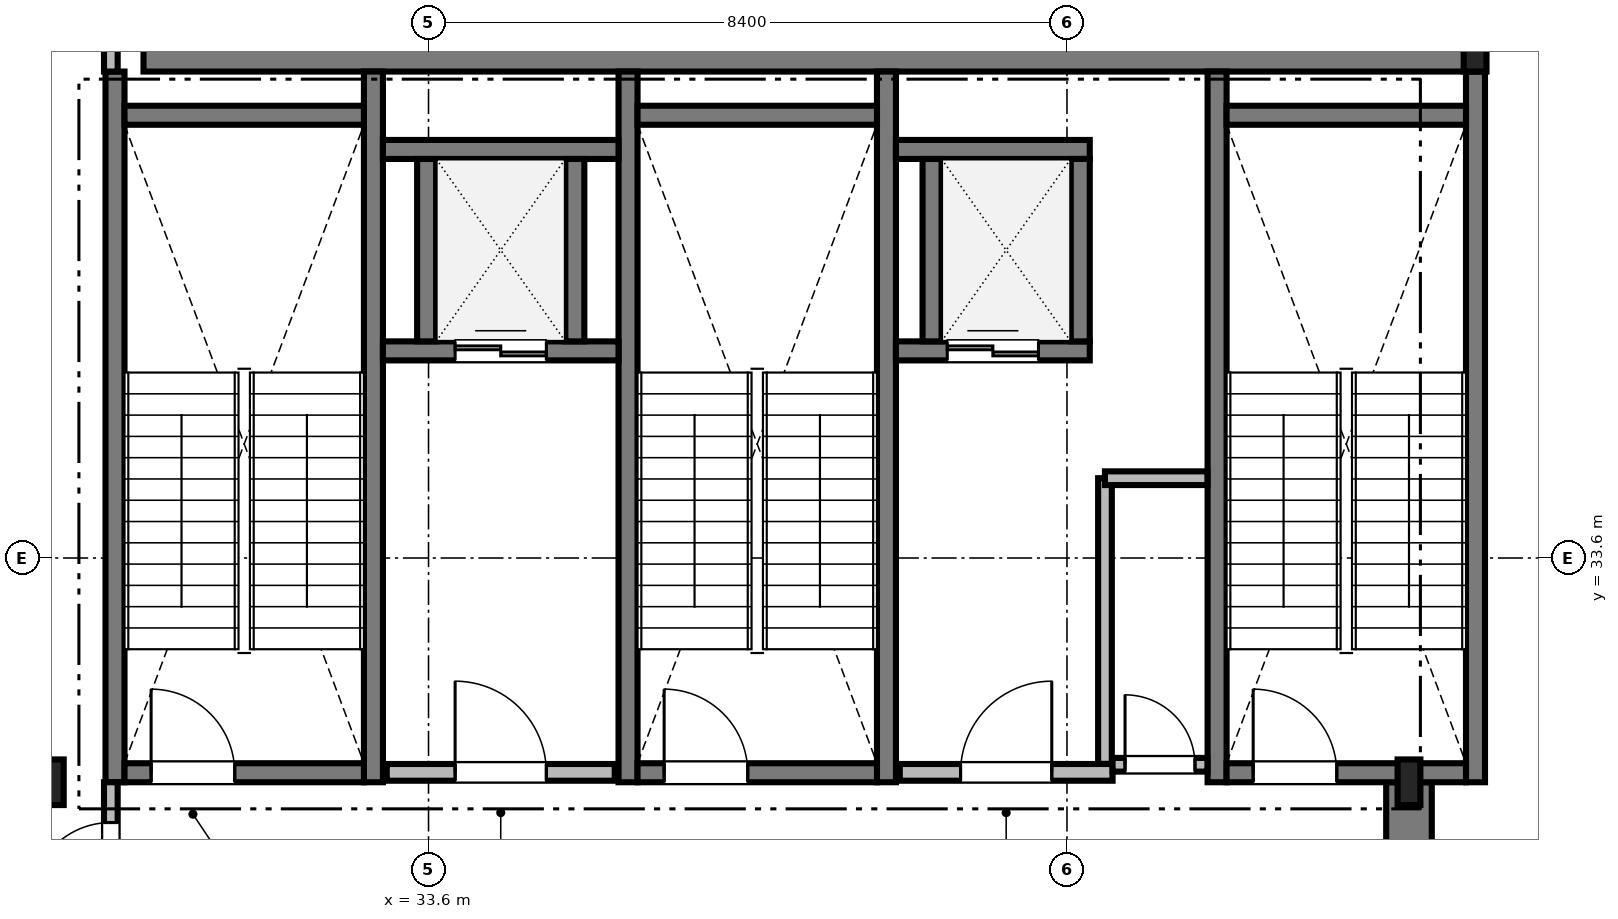
"""IFC4 building model, lengths in metres.
Left out: names, types, materials, properties, quantities, classifications, styles, units other than length and angle.
Written with IfcOpenShell. Run it as: python <this file> out.ifc"""

import sys

from ifc_helpers import new_model, si_unit, direction, frame, frame_2d, origin, origin_2d, place, context, subcontext, project, spatial, rectangle, i_section, extrude, source, transform, mapped, element, fill, save


model = new_model("IFC4")
c1 = context("Model", 3, precision=1e-05, world=origin(), true_north=direction((0.0, 1.0)))
c2 = subcontext(c1, "Body", "Model", "MODEL_VIEW")
j1 = project(units=[si_unit("LENGTHUNIT", "METRE"), si_unit("PLANEANGLEUNIT", "RADIAN")], contexts=[c1])
p1 = place(None, origin())
s1 = spatial("IfcSite", under=j1, at=p1, CompositionType="ELEMENT")
p2 = place(p1, origin())
s2 = spatial("IfcBuilding", under=s1, at=p2, CompositionType="ELEMENT")
p3 = place(p2, frame((0.0, 0.0, 296.15)))
s3 = spatial("IfcBuildingStorey", under=s2, at=p3, CompositionType="ELEMENT", Elevation=296.15)
m1 = source(origin(), c2, "Body", "SweptSolid", [
    extrude(rectangle(XDim=17.52, YDim=0.6, at=frame_2d((8.76, 0.0))), origin(), (0.0, 0.0, 1.0), 4.7),
])
p4 = place(p3, frame((29.85, 40.3, 0.0), z_axis=(0.0, 0.0, 1.0), x_axis=(1.0, 0.0, 0.0)))
e1 = element("IfcWall", 1, at=p4, inside=s3, PredefinedType="SHEAR", context=c2, shape_type="MappedRepresentation", body=[
    mapped(m1, transform((0.0, 0.0, 0.0), scale=1.0)),
])
m2 = source(origin(), c2, "Body", "SweptSolid", [
    extrude(rectangle(XDim=13.15, YDim=0.6, at=frame_2d((6.575, 0.0))), origin(), (0.0, 0.0, 1.0), 4.7),
])
p5 = place(p3, frame((46.5, 17.5, 0.0), z_axis=(0.0, 0.0, 1.0), x_axis=(0.0, 1.0, 0.0)))
e2 = element("IfcWall", 2, at=p5, inside=s3, PredefinedType="SHEAR", context=c2, shape_type="MappedRepresentation", body=[
    mapped(m2, transform((0.0, 0.0, 0.0), scale=1.0)),
])
m3 = source(origin(), c2, "Body", "SweptSolid", [
    extrude(i_section(OverallWidth=0.3, OverallDepth=0.6, WebThickness=0.015, FlangeThickness=0.03, FilletRadius=0.027, at=origin_2d()), origin(), (0.0, 0.0, 1.0), 4.7),
])
for number, where, z_axis, x_axis in (
    (3, (28.65, 30.65, 0.0), (0.0, 0.0, 1.0), (1.0, 0.0, 0.0)),
    (4, (46.5, 30.65, 0.0), (0.0, 0.0, 1.0), (1.0, 0.0, 0.0)),
    (5, (47.37, 40.3, 0.0), (0.0, 0.0, 1.0), (1.0, 0.0, 0.0)),
):
    element("IfcColumn", number, at=place(p3, frame(where, z_axis=z_axis, x_axis=x_axis)), inside=s3, PredefinedType="COLUMN", context=c2, shape_type="MappedRepresentation", body=[
        mapped(m3, transform((0.0, 0.0, 0.0), scale=1.0)),
    ])
m4 = source(origin(), c2, "Body", "SweptSolid", [
    extrude(rectangle(XDim=9.35, YDim=0.25, at=frame_2d((4.675, 0.0))), origin(), (0.0, 0.0, 1.0), 4.8),
])
for number, where, z_axis, x_axis in (
    (6, (29.475, 30.65, 0.0), (0.0, 0.0, 1.0), (0.0, 1.0, 0.0)),
    (7, (32.875, 30.65, 0.0), (0.0, 0.0, 1.0), (0.0, 1.0, 0.0)),
):
    element("IfcWall", number, at=place(p3, frame(where, z_axis=z_axis, x_axis=x_axis)), inside=s3, PredefinedType="SOLIDWALL", context=c2, shape_type="MappedRepresentation", body=[
        mapped(m4, transform((0.0, 0.0, 0.0), scale=1.0)),
    ])
m5 = source(origin(), c2, "Body", "SweptSolid", [
    extrude(rectangle(XDim=3.15, YDim=0.25, at=frame_2d((1.575, 0.0))), origin(), (0.0, 0.0, 1.0), 4.8),
])
p6 = place(p3, frame((29.6, 39.425, 0.0), z_axis=(0.0, 0.0, 1.0), x_axis=(1.0, 0.0, 0.0)))
e8 = element("IfcWall", 8, at=p6, inside=s3, PredefinedType="SOLIDWALL", context=c2, shape_type="MappedRepresentation", body=[
    mapped(m5, transform((0.0, 0.0, 0.0), scale=1.0)),
])
p7 = place(p3, frame((29.6, 30.775, 0.0), z_axis=(0.0, 0.0, 1.0), x_axis=(1.0, 0.0, 0.0)))
e9 = element("IfcWall", 9, at=p7, inside=s3, PredefinedType="SOLIDWALL", context=c2, shape_type="MappedRepresentation", body=[
    mapped(m5, transform((0.0, 0.0, 0.0), scale=1.0)),
])
m6 = source(origin(), c2, "Body", "SweptSolid", [
    extrude(rectangle(XDim=1.1, YDim=2.2, at=frame_2d((0.55, 1.1))), frame((0.0, 0.135, 0.0), z_axis=(0.0, -1.0, 0.0), x_axis=(1.0, 0.0, 0.0)), (0.0, 0.0, 1.0), 0.27),
])
p8 = place(p7, frame((0.35, 0.0, 0.0)))
e10 = element("IfcOpeningElement", 10, at=p8, cuts=e9, PredefinedType="OPENING", context=c2, shape_type="MappedRepresentation", body=[
    mapped(m6, transform((0.0, 0.0, 0.0), scale=1.0)),
])
for number, where, z_axis, x_axis in (
    (11, (36.225, 30.65, 0.0), (0.0, 0.0, 1.0), (0.0, 1.0, 0.0)),
    (12, (39.625, 30.65, 0.0), (0.0, 0.0, 1.0), (0.0, 1.0, 0.0)),
):
    element("IfcWall", number, at=place(p3, frame(where, z_axis=z_axis, x_axis=x_axis)), inside=s3, PredefinedType="SOLIDWALL", context=c2, shape_type="MappedRepresentation", body=[
        mapped(m4, transform((0.0, 0.0, 0.0), scale=1.0)),
    ])
p9 = place(p3, frame((36.35, 39.425, 0.0), z_axis=(0.0, 0.0, 1.0), x_axis=(1.0, 0.0, 0.0)))
e13 = element("IfcWall", 13, at=p9, inside=s3, PredefinedType="SOLIDWALL", context=c2, shape_type="MappedRepresentation", body=[
    mapped(m5, transform((0.0, 0.0, 0.0), scale=1.0)),
])
p10 = place(p3, frame((36.35, 30.775, 0.0), z_axis=(0.0, 0.0, 1.0), x_axis=(1.0, 0.0, 0.0)))
e14 = element("IfcWall", 14, at=p10, inside=s3, PredefinedType="SOLIDWALL", context=c2, shape_type="MappedRepresentation", body=[
    mapped(m5, transform((0.0, 0.0, 0.0), scale=1.0)),
])
p11 = place(p10, frame((0.35, 0.0, 0.0)))
e15 = element("IfcOpeningElement", 15, at=p11, cuts=e14, PredefinedType="OPENING", context=c2, shape_type="MappedRepresentation", body=[
    mapped(m6, transform((0.0, 0.0, 0.0), scale=1.0)),
])
for number, where, z_axis, x_axis in (
    (16, (43.975, 30.65, 0.0), (0.0, 0.0, 1.0), (0.0, 1.0, 0.0)),
    (17, (47.375, 30.65, 0.0), (0.0, 0.0, 1.0), (0.0, 1.0, 0.0)),
):
    element("IfcWall", number, at=place(p3, frame(where, z_axis=z_axis, x_axis=x_axis)), inside=s3, PredefinedType="SOLIDWALL", context=c2, shape_type="MappedRepresentation", body=[
        mapped(m4, transform((0.0, 0.0, 0.0), scale=1.0)),
    ])
p12 = place(p3, frame((44.1, 39.425, 0.0), z_axis=(0.0, 0.0, 1.0), x_axis=(1.0, 0.0, 0.0)))
e18 = element("IfcWall", 18, at=p12, inside=s3, PredefinedType="SOLIDWALL", context=c2, shape_type="MappedRepresentation", body=[
    mapped(m5, transform((0.0, 0.0, 0.0), scale=1.0)),
])
p13 = place(p3, frame((44.1, 30.775, 0.0), z_axis=(0.0, 0.0, 1.0), x_axis=(1.0, 0.0, 0.0)))
e19 = element("IfcWall", 19, at=p13, inside=s3, PredefinedType="SOLIDWALL", context=c2, shape_type="MappedRepresentation", body=[
    mapped(m5, transform((0.0, 0.0, 0.0), scale=1.0)),
])
p14 = place(p13, frame((0.35, 0.0, 0.0)))
e20 = element("IfcOpeningElement", 20, at=p14, cuts=e19, PredefinedType="OPENING", context=c2, shape_type="MappedRepresentation", body=[
    mapped(m6, transform((0.0, 0.0, 0.0), scale=1.0)),
])
m7 = source(origin(), c2, "Body", "SweptSolid", [
    extrude(rectangle(XDim=3.0, YDim=0.22, at=frame_2d((1.5, 0.0))), origin(), (0.0, 0.0, 1.0), 4.7),
])
p15 = place(p3, frame((33.05, 30.78, 0.0), z_axis=(0.0, 0.0, 1.0), x_axis=(1.0, 0.0, 0.0)))
e21 = element("IfcWall", 21, at=p15, inside=s3, PredefinedType="SOLIDWALL", context=c2, shape_type="MappedRepresentation", body=[
    mapped(m7, transform((0.0, 0.0, 0.0), scale=1.0)),
])
m8 = source(origin(), c2, "Body", "SweptSolid", [
    extrude(rectangle(XDim=1.2, YDim=2.2, at=frame_2d((0.6, 1.1))), frame((0.0, 0.12, 0.0), z_axis=(0.0, -1.0, 0.0), x_axis=(1.0, 0.0, 0.0)), (0.0, 0.0, 1.0), 0.24),
])
p16 = place(p15, frame((0.9, 0.0, 0.0)))
e22 = element("IfcOpeningElement", 22, at=p16, cuts=e21, PredefinedType="OPENING", context=c2, shape_type="MappedRepresentation", body=[
    mapped(m8, transform((0.0, 0.0, 0.0), scale=1.0)),
])
m9 = source(origin(), c2, "Body", "SweptSolid", [
    extrude(rectangle(XDim=2.8, YDim=0.22, at=frame_2d((1.4, 0.0))), origin(), (0.0, 0.0, 1.0), 4.7),
])
p17 = place(p3, frame((39.8, 30.78, 0.0), z_axis=(0.0, 0.0, 1.0), x_axis=(1.0, 0.0, 0.0)))
e23 = element("IfcWall", 23, at=p17, inside=s3, PredefinedType="SOLIDWALL", context=c2, shape_type="MappedRepresentation", body=[
    mapped(m9, transform((0.0, 0.0, 0.0), scale=1.0)),
])
p18 = place(p17, frame((0.8, 0.0, 0.0)))
e24 = element("IfcOpeningElement", 24, at=p18, cuts=e23, PredefinedType="OPENING", context=c2, shape_type="MappedRepresentation", body=[
    mapped(m8, transform((0.0, 0.0, 0.0), scale=1.0)),
])
m10 = source(origin(), c2, "Body", "SweptSolid", [
    extrude(rectangle(XDim=3.1, YDim=0.25, at=frame_2d((1.55, 0.0))), origin(), (0.0, 0.0, 1.0), 4.7),
])
p19 = place(p3, frame((33.0, 36.325, 0.0), z_axis=(0.0, 0.0, 1.0), x_axis=(1.0, 0.0, 0.0)))
e25 = element("IfcWall", 25, at=p19, inside=s3, PredefinedType="SOLIDWALL", context=c2, shape_type="MappedRepresentation", body=[
    mapped(m10, transform((0.0, 0.0, 0.0), scale=1.0)),
])
m11 = source(origin(), c2, "Body", "SweptSolid", [
    extrude(rectangle(XDim=1.2, YDim=2.25, at=frame_2d((0.6, 1.125))), frame((0.0, 0.135, 0.0), z_axis=(0.0, -1.0, 0.0), x_axis=(1.0, 0.0, 0.0)), (0.0, 0.0, 1.0), 0.27),
])
p20 = place(p19, frame((0.95, 0.0, 0.0)))
e26 = element("IfcOpeningElement", 26, at=p20, cuts=e25, PredefinedType="OPENING", context=c2, shape_type="MappedRepresentation", body=[
    mapped(m11, transform((0.0, 0.0, 0.0), scale=1.0)),
])
p21 = place(p3, frame((33.0, 38.975, 0.0), z_axis=(0.0, 0.0, 1.0), x_axis=(1.0, 0.0, 0.0)))
e27 = element("IfcWall", 27, at=p21, inside=s3, PredefinedType="SOLIDWALL", context=c2, shape_type="MappedRepresentation", body=[
    mapped(m10, transform((0.0, 0.0, 0.0), scale=1.0)),
])
m12 = source(origin(), c2, "Body", "SweptSolid", [
    extrude(rectangle(XDim=2.4, YDim=0.25, at=frame_2d((1.2, 0.0))), origin(), (0.0, 0.0, 1.0), 4.7),
])
for number, where, z_axis, x_axis in (
    (28, (33.575, 36.45, 0.0), (0.0, 0.0, 1.0), (0.0, 1.0, 0.0)),
    (29, (35.525, 36.45, 0.0), (0.0, 0.0, 1.0), (0.0, 1.0, 0.0)),
):
    element("IfcWall", number, at=place(p3, frame(where, z_axis=z_axis, x_axis=x_axis)), inside=s3, PredefinedType="SOLIDWALL", context=c2, shape_type="MappedRepresentation", body=[
        mapped(m12, transform((0.0, 0.0, 0.0), scale=1.0)),
    ])
m13 = source(origin(), c2, "Body", "SweptSolid", [
    extrude(rectangle(XDim=2.55, YDim=0.25, at=frame_2d((1.275, 0.0))), origin(), (0.0, 0.0, 1.0), 4.7),
])
p22 = place(p3, frame((39.75, 36.325, 0.0), z_axis=(0.0, 0.0, 1.0), x_axis=(1.0, 0.0, 0.0)))
e30 = element("IfcWall", 30, at=p22, inside=s3, PredefinedType="SOLIDWALL", context=c2, shape_type="MappedRepresentation", body=[
    mapped(m13, transform((0.0, 0.0, 0.0), scale=1.0)),
])
p23 = place(p22, frame((0.675, 0.0, 0.0)))
e31 = element("IfcOpeningElement", 31, at=p23, cuts=e30, PredefinedType="OPENING", context=c2, shape_type="MappedRepresentation", body=[
    mapped(m11, transform((0.0, 0.0, 0.0), scale=1.0)),
])
p24 = place(p3, frame((39.75, 38.975, 0.0), z_axis=(0.0, 0.0, 1.0), x_axis=(1.0, 0.0, 0.0)))
e32 = element("IfcWall", 32, at=p24, inside=s3, PredefinedType="SOLIDWALL", context=c2, shape_type="MappedRepresentation", body=[
    mapped(m13, transform((0.0, 0.0, 0.0), scale=1.0)),
])
for number, where, z_axis, x_axis in (
    (33, (40.225, 36.45, 0.0), (0.0, 0.0, 1.0), (0.0, 1.0, 0.0)),
    (34, (42.175, 36.45, 0.0), (0.0, 0.0, 1.0), (0.0, 1.0, 0.0)),
):
    element("IfcWall", number, at=place(p3, frame(where, z_axis=z_axis, x_axis=x_axis)), inside=s3, PredefinedType="SOLIDWALL", context=c2, shape_type="MappedRepresentation", body=[
        mapped(m12, transform((0.0, 0.0, 0.0), scale=1.0)),
    ])
m14 = source(origin(), c2, "Body", "SweptSolid", [
    extrude(rectangle(XDim=2.13, YDim=0.18, at=frame_2d((1.065, 0.0))), origin(), (0.0, 0.0, 1.0), 4.332),
])
p25 = place(p3, frame((29.42, 28.52, 0.0), z_axis=(0.0, 0.0, 1.0), x_axis=(0.0, 1.0, 0.0)))
e35 = element("IfcWall", 35, at=p25, inside=s3, PredefinedType="PARTITIONING", context=c2, shape_type="MappedRepresentation", body=[
    mapped(m14, transform((0.0, 0.0, 0.0), scale=1.0)),
])
m15 = source(origin(), c2, "Body", "SweptSolid", [
    extrude(rectangle(XDim=1.05, YDim=2.2, at=frame_2d((0.525, 1.1))), frame((0.0, 0.1, 0.0), z_axis=(0.0, -1.0, 0.0), x_axis=(1.0, 0.0, 0.0)), (0.0, 0.0, 1.0), 0.2),
])
p26 = place(p25, frame((0.55, 0.0, 0.0)))
e36 = element("IfcOpeningElement", 36, at=p26, cuts=e35, PredefinedType="OPENING", context=c2, shape_type="MappedRepresentation", body=[
    mapped(m15, transform((0.0, 0.0, 0.0), scale=1.0)),
])
m16 = source(origin(), c2, "Body", "SweptSolid", [
    extrude(rectangle(XDim=2.878, YDim=0.18, at=frame_2d((1.439, 0.0))), origin(), (0.0, 0.0, 1.0), 3.942),
])
p27 = place(p3, frame((29.42, 40.0, 0.0), z_axis=(0.0, 0.0, 1.0), x_axis=(0.0, 1.0, 0.0)))
e37 = element("IfcWall", 37, at=p27, inside=s3, PredefinedType="PARTITIONING", context=c2, shape_type="MappedRepresentation", body=[
    mapped(m16, transform((0.0, 0.0, 0.0), scale=1.0)),
])
m17 = source(origin(), c2, "Body", "SweptSolid", [
    extrude(rectangle(XDim=1.248, YDim=0.18, at=frame_2d((0.624, 0.0))), origin(), (0.0, 0.0, 1.0), 4.7),
])
p28 = place(p3, frame((42.6, 30.88, 0.0), z_axis=(0.0, 0.0, 1.0), x_axis=(1.0, 0.0, 0.0)))
e38 = element("IfcWall", 38, at=p28, inside=s3, PredefinedType="PARTITIONING", context=c2, shape_type="MappedRepresentation", body=[
    mapped(m17, transform((0.0, 0.0, 0.0), scale=1.0)),
])
m18 = source(origin(), c2, "Body", "SweptSolid", [
    extrude(rectangle(XDim=0.92, YDim=2.1, at=frame_2d((0.46, 1.05))), frame((0.0, 0.1, 0.0), z_axis=(0.0, -1.0, 0.0), x_axis=(1.0, 0.0, 0.0)), (0.0, 0.0, 1.0), 0.2),
])
p29 = place(p28, frame((0.164, 0.0, 0.0)))
e39 = element("IfcOpeningElement", 39, at=p29, cuts=e38, PredefinedType="OPENING", context=c2, shape_type="MappedRepresentation", body=[
    mapped(m18, transform((0.0, 0.0, 0.0), scale=1.0)),
])
m19 = source(origin(), c2, "Body", "SweptSolid", [
    extrude(rectangle(XDim=3.758, YDim=0.18, at=frame_2d((1.879, 0.0))), origin(), (0.0, 0.0, 1.0), 4.7),
])
p30 = place(p3, frame((42.5, 30.892, 0.0), z_axis=(0.0, 0.0, 1.0), x_axis=(0.0, 1.0, 0.0)))
e40 = element("IfcWall", 40, at=p30, inside=s3, PredefinedType="PARTITIONING", context=c2, shape_type="MappedRepresentation", body=[
    mapped(m19, transform((0.0, 0.0, 0.0), scale=1.0)),
])
m20 = source(origin(), c2, "Body", "SweptSolid", [
    extrude(rectangle(XDim=1.348, YDim=0.18, at=frame_2d((0.674, 0.0))), origin(), (0.0, 0.0, 1.0), 4.7),
])
p31 = place(p3, frame((42.5, 34.65, 0.0), z_axis=(0.0, 0.0, 1.0), x_axis=(1.0, 0.0, 0.0)))
e41 = element("IfcWall", 41, at=p31, inside=s3, PredefinedType="PARTITIONING", context=c2, shape_type="MappedRepresentation", body=[
    mapped(m20, transform((0.0, 0.0, 0.0), scale=1.0)),
])
m21 = source(origin(), c2, "Body", "SweptSolid", [
    extrude(rectangle(XDim=1.1, YDim=2.2, at=frame_2d((0.55, 1.1))), frame((0.0, 0.025, 0.0), z_axis=(0.0, -1.0, 0.0), x_axis=(1.0, 0.0, 0.0)), (0.0, 0.0, 1.0), 0.05),
])
p32 = place(p8, origin())
e42 = element("IfcDoor", 42, at=p32, inside=s3, OperationType="SINGLE_SWING_LEFT", PredefinedType="DOOR", context=c2, shape_type="MappedRepresentation", body=[
    mapped(m21, transform((0.0, 0.0, 0.0), scale=1.0)),
])
fill(e10, e42)
p33 = place(p11, origin())
e43 = element("IfcDoor", 43, at=p33, inside=s3, OperationType="SINGLE_SWING_LEFT", PredefinedType="DOOR", context=c2, shape_type="MappedRepresentation", body=[
    mapped(m21, transform((0.0, 0.0, 0.0), scale=1.0)),
])
fill(e15, e43)
p34 = place(p14, origin())
e44 = element("IfcDoor", 44, at=p34, inside=s3, OperationType="SINGLE_SWING_LEFT", PredefinedType="DOOR", context=c2, shape_type="MappedRepresentation", body=[
    mapped(m21, transform((0.0, 0.0, 0.0), scale=1.0)),
])
fill(e20, e44)
m22 = source(origin(), c2, "Body", "SweptSolid", [
    extrude(rectangle(XDim=1.2, YDim=2.2, at=frame_2d((0.6, 1.1))), frame((0.0, 0.025, 0.0), z_axis=(0.0, -1.0, 0.0), x_axis=(1.0, 0.0, 0.0)), (0.0, 0.0, 1.0), 0.05),
])
p35 = place(p16, origin())
e45 = element("IfcDoor", 45, at=p35, inside=s3, OperationType="SINGLE_SWING_LEFT", PredefinedType="DOOR", context=c2, shape_type="MappedRepresentation", body=[
    mapped(m22, transform((0.0, 0.0, 0.0), scale=1.0)),
])
fill(e22, e45)
p36 = place(p18, origin())
e46 = element("IfcDoor", 46, at=p36, inside=s3, OperationType="SINGLE_SWING_RIGHT", PredefinedType="DOOR", context=c2, shape_type="MappedRepresentation", body=[
    mapped(m22, transform((0.0, 0.0, 0.0), scale=1.0)),
])
fill(e24, e46)
m23 = source(origin(), c2, "Body", "SweptSolid", [
    extrude(rectangle(XDim=1.2, YDim=2.25, at=frame_2d((0.6, 1.125))), frame((0.0, 0.025, 0.0), z_axis=(0.0, -1.0, 0.0), x_axis=(1.0, 0.0, 0.0)), (0.0, 0.0, 1.0), 0.05),
])
p37 = place(p20, origin())
e47 = element("IfcDoor", 47, at=p37, inside=s3, OperationType="DOUBLE_DOOR_SLIDING", PredefinedType="DOOR", context=c2, shape_type="MappedRepresentation", body=[
    mapped(m23, transform((0.0, 0.0, 0.0), scale=1.0)),
])
fill(e26, e47)
p38 = place(p23, origin())
e48 = element("IfcDoor", 48, at=p38, inside=s3, OperationType="DOUBLE_DOOR_SLIDING", PredefinedType="DOOR", context=c2, shape_type="MappedRepresentation", body=[
    mapped(m23, transform((0.0, 0.0, 0.0), scale=1.0)),
])
fill(e31, e48)
m24 = source(origin(), c2, "Body", "SweptSolid", [
    extrude(rectangle(XDim=1.05, YDim=2.2, at=frame_2d((0.525, 1.1))), frame((0.0, 0.025, 0.0), z_axis=(0.0, -1.0, 0.0), x_axis=(1.0, 0.0, 0.0)), (0.0, 0.0, 1.0), 0.05),
])
p39 = place(p26, origin())
e49 = element("IfcDoor", 49, at=p39, inside=s3, OperationType="SINGLE_SWING_LEFT", PredefinedType="DOOR", context=c2, shape_type="MappedRepresentation", body=[
    mapped(m24, transform((0.0, 0.0, 0.0), scale=1.0)),
])
fill(e36, e49)
m25 = source(origin(), c2, "Body", "SweptSolid", [
    extrude(rectangle(XDim=0.92, YDim=2.1, at=frame_2d((0.46, 1.05))), frame((0.0, 0.025, 0.0), z_axis=(0.0, -1.0, 0.0), x_axis=(1.0, 0.0, 0.0)), (0.0, 0.0, 1.0), 0.05),
])
p40 = place(p29, origin())
e50 = element("IfcDoor", 50, at=p40, inside=s3, OperationType="SINGLE_SWING_LEFT", PredefinedType="DOOR", context=c2, shape_type="MappedRepresentation", body=[
    mapped(m25, transform((0.0, 0.0, 0.0), scale=1.0)),
])
fill(e39, e50)
save(model, sys.argv[1])
